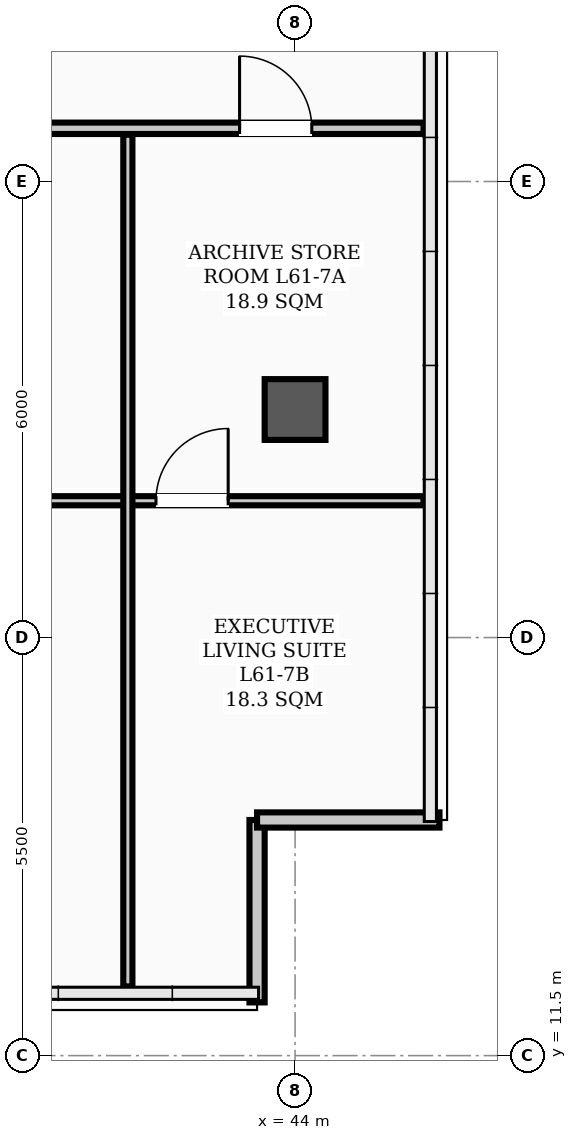
"""IFC4 building model, lengths in metres.
Left out: names, types, materials, properties, quantities, classifications, styles, units other than length and angle.
Written with IfcOpenShell. Run it as: python <this file> out.ifc"""

import sys

from ifc_helpers import new_model, si_unit, direction, frame, frame_2d, origin, origin_2d, place, context, subcontext, project, spatial, rectangle, hollow_rectangle, extrude, element, fill, save


model = new_model("IFC4")
c1 = context("Model", 3, precision=1e-05, world=origin(), true_north=direction((0.0, 1.0)))
c2 = subcontext(c1, "Body", "Model", "MODEL_VIEW")
j1 = project(units=[si_unit("LENGTHUNIT", "METRE"), si_unit("PLANEANGLEUNIT", "RADIAN")], contexts=[c1])
p1 = place(None, origin())
s1 = spatial("IfcSite", under=j1, at=p1, CompositionType="ELEMENT")
p2 = place(p1, origin())
s2 = spatial("IfcBuilding", under=s1, at=p2, CompositionType="ELEMENT")
p3 = place(p2, frame((0.0, 0.0, 246.2)))
s3 = spatial("IfcBuildingStorey", under=s2, at=p3, CompositionType="ELEMENT", Elevation=246.2)
p4 = place(p3, frame((44.0, 20.0, 0.0), z_axis=(0.0, 0.0, 1.0), x_axis=(1.0, 0.0, 0.0)))
e1 = element("IfcColumn", 1, at=p4, inside=s3, PredefinedType="COLUMN", context=c2, shape_type="SweptSolid", body=[
    extrude(hollow_rectangle(XDim=0.8, YDim=0.8, WallThickness=0.032, InnerFilletRadius=0.016, OuterFilletRadius=0.048, at=origin_2d()), origin(), (0.0, 0.0, 1.0), 3.9),
])
p5 = place(p3, frame((43.5, 12.2, 0.0), z_axis=(0.0, 0.0, 1.0), x_axis=(0.0, 1.0, 0.0)))
e2 = element("IfcWall", 2, at=p5, inside=s3, PredefinedType="PARAPET", context=c2, shape_type="SweptSolid", body=[
    extrude(rectangle(XDim=2.4, YDim=0.2, at=frame_2d((1.2, 0.0))), origin(), (0.0, 0.0, 1.0), 1.2),
])
p6 = place(p3, frame((43.5, 14.6, 0.0), z_axis=(0.0, 0.0, 1.0), x_axis=(1.0, 0.0, 0.0)))
e3 = element("IfcWall", 3, at=p6, inside=s3, PredefinedType="PARAPET", context=c2, shape_type="SweptSolid", body=[
    extrude(rectangle(XDim=2.4, YDim=0.2, at=frame_2d((1.2, 0.0))), origin(), (0.0, 0.0, 1.0), 1.2),
])
p7 = place(p3, frame((4.81, 23.7, 0.0), z_axis=(0.0, 0.0, 1.0), x_axis=(1.0, 0.0, 0.0)))
e4 = element("IfcWall", 4, at=p7, inside=s3, PredefinedType="PARTITIONING", context=c2, shape_type="SweptSolid", body=[
    extrude(rectangle(XDim=40.88, YDim=0.15, at=frame_2d((20.44, 0.0))), origin(), (0.0, 0.0, 1.0), 3.2),
])
p8 = place(p7, frame((5.865, 0.0, 0.0)))
e5 = element("IfcOpeningElement", 5, at=p8, cuts=e4, PredefinedType="OPENING", context=c2, shape_type="SweptSolid", body=[
    extrude(rectangle(XDim=0.95, YDim=2.08, at=frame_2d((0.475, 1.04))), frame((0.0, 0.085, 0.0), z_axis=(0.0, -1.0, 0.0), x_axis=(1.0, 0.0, 0.0)), (0.0, 0.0, 1.0), 0.17),
])
p9 = place(p7, frame((13.115, 0.0, 0.0)))
e6 = element("IfcOpeningElement", 6, at=p9, cuts=e4, PredefinedType="OPENING", context=c2, shape_type="SweptSolid", body=[
    extrude(rectangle(XDim=0.95, YDim=2.08, at=frame_2d((0.475, 1.04))), frame((0.0, 0.085, 0.0), z_axis=(0.0, -1.0, 0.0), x_axis=(1.0, 0.0, 0.0)), (0.0, 0.0, 1.0), 0.17),
])
p10 = place(p7, frame((16.515, 0.0, 0.0)))
e7 = element("IfcOpeningElement", 7, at=p10, cuts=e4, PredefinedType="OPENING", context=c2, shape_type="SweptSolid", body=[
    extrude(rectangle(XDim=0.95, YDim=2.08, at=frame_2d((0.475, 1.04))), frame((0.0, 0.085, 0.0), z_axis=(0.0, -1.0, 0.0), x_axis=(1.0, 0.0, 0.0)), (0.0, 0.0, 1.0), 0.17),
])
p11 = place(p7, frame((22.915, 0.0, 0.0)))
e8 = element("IfcOpeningElement", 8, at=p11, cuts=e4, PredefinedType="OPENING", context=c2, shape_type="SweptSolid", body=[
    extrude(rectangle(XDim=0.95, YDim=2.08, at=frame_2d((0.475, 1.04))), frame((0.0, 0.085, 0.0), z_axis=(0.0, -1.0, 0.0), x_axis=(1.0, 0.0, 0.0)), (0.0, 0.0, 1.0), 0.17),
])
p12 = place(p7, frame((29.115, 0.0, 0.0)))
e9 = element("IfcOpeningElement", 9, at=p12, cuts=e4, PredefinedType="OPENING", context=c2, shape_type="SweptSolid", body=[
    extrude(rectangle(XDim=0.95, YDim=2.08, at=frame_2d((0.475, 1.04))), frame((0.0, 0.085, 0.0), z_axis=(0.0, -1.0, 0.0), x_axis=(1.0, 0.0, 0.0)), (0.0, 0.0, 1.0), 0.17),
])
p13 = place(p7, frame((34.215, 0.0, 0.0)))
e10 = element("IfcOpeningElement", 10, at=p13, cuts=e4, PredefinedType="OPENING", context=c2, shape_type="SweptSolid", body=[
    extrude(rectangle(XDim=0.95, YDim=2.08, at=frame_2d((0.475, 1.04))), frame((0.0, 0.085, 0.0), z_axis=(0.0, -1.0, 0.0), x_axis=(1.0, 0.0, 0.0)), (0.0, 0.0, 1.0), 0.17),
])
p14 = place(p7, frame((38.46, 0.0, 0.0)))
e11 = element("IfcOpeningElement", 11, at=p14, cuts=e4, PredefinedType="OPENING", context=c2, shape_type="SweptSolid", body=[
    extrude(rectangle(XDim=0.95, YDim=2.08, at=frame_2d((0.475, 1.04))), frame((0.0, 0.085, 0.0), z_axis=(0.0, -1.0, 0.0), x_axis=(1.0, 0.0, 0.0)), (0.0, 0.0, 1.0), 0.17),
])
p15 = place(p3, frame((37.2, 18.8, 0.0), z_axis=(0.0, 0.0, 1.0), x_axis=(1.0, 0.0, 0.0)))
e12 = element("IfcWall", 12, at=p15, inside=s3, PredefinedType="PARTITIONING", context=c2, shape_type="SweptSolid", body=[
    extrude(rectangle(XDim=4.6, YDim=0.12, at=frame_2d((2.3, 0.0))), origin(), (0.0, 0.0, 1.0), 3.2),
])
p16 = place(p15, frame((1.825, 0.0, 0.0)))
e13 = element("IfcOpeningElement", 13, at=p16, cuts=e12, PredefinedType="OPENING", context=c2, shape_type="SweptSolid", body=[
    extrude(rectangle(XDim=0.95, YDim=2.08, at=frame_2d((0.475, 1.04))), frame((0.0, 0.07, 0.0), z_axis=(0.0, -1.0, 0.0), x_axis=(1.0, 0.0, 0.0)), (0.0, 0.0, 1.0), 0.14),
])
p17 = place(p3, frame((41.8, 18.8, 0.0), z_axis=(0.0, 0.0, 1.0), x_axis=(1.0, 0.0, 0.0)))
e14 = element("IfcWall", 14, at=p17, inside=s3, PredefinedType="PARTITIONING", context=c2, shape_type="SweptSolid", body=[
    extrude(rectangle(XDim=3.89, YDim=0.12, at=frame_2d((1.945, 0.0))), origin(), (0.0, 0.0, 1.0), 3.72),
])
p18 = place(p17, frame((0.37, 0.0, 0.0)))
e15 = element("IfcOpeningElement", 15, at=p18, cuts=e14, PredefinedType="OPENING", context=c2, shape_type="SweptSolid", body=[
    extrude(rectangle(XDim=0.95, YDim=2.08, at=frame_2d((0.475, 1.04))), frame((0.0, 0.07, 0.0), z_axis=(0.0, -1.0, 0.0), x_axis=(1.0, 0.0, 0.0)), (0.0, 0.0, 1.0), 0.14),
])
p19 = place(p3, frame((41.8, 12.41, 0.0), z_axis=(0.0, 0.0, 1.0), x_axis=(0.0, 1.0, 0.0)))
e16 = element("IfcWall", 16, at=p19, inside=s3, PredefinedType="PARTITIONING", context=c2, shape_type="SweptSolid", body=[
    extrude(rectangle(XDim=11.205, YDim=0.12, at=frame_2d((5.603, 0.0))), origin(), (0.0, 0.0, 1.0), 3.72),
])
p20 = place(p18, origin())
e17 = element("IfcDoor", 17, at=p20, inside=s3, OperationType="SINGLE_SWING_RIGHT", PredefinedType="DOOR", context=c2, shape_type="SweptSolid", body=[
    extrude(rectangle(XDim=0.95, YDim=2.08, at=frame_2d((0.475, 1.04))), frame((0.0, 0.025, 0.0), z_axis=(0.0, -1.0, 0.0), x_axis=(1.0, 0.0, 0.0)), (0.0, 0.0, 1.0), 0.05),
])
fill(e15, e17)
p21 = place(p14, origin())
e18 = element("IfcDoor", 18, at=p21, inside=s3, OperationType="SINGLE_SWING_LEFT", PredefinedType="DOOR", context=c2, shape_type="SweptSolid", body=[
    extrude(rectangle(XDim=0.95, YDim=2.08, at=frame_2d((0.475, 1.04))), frame((0.0, 0.025, 0.0), z_axis=(0.0, -1.0, 0.0), x_axis=(1.0, 0.0, 0.0)), (0.0, 0.0, 1.0), 0.05),
])
fill(e11, e18)
save(model, sys.argv[1])
